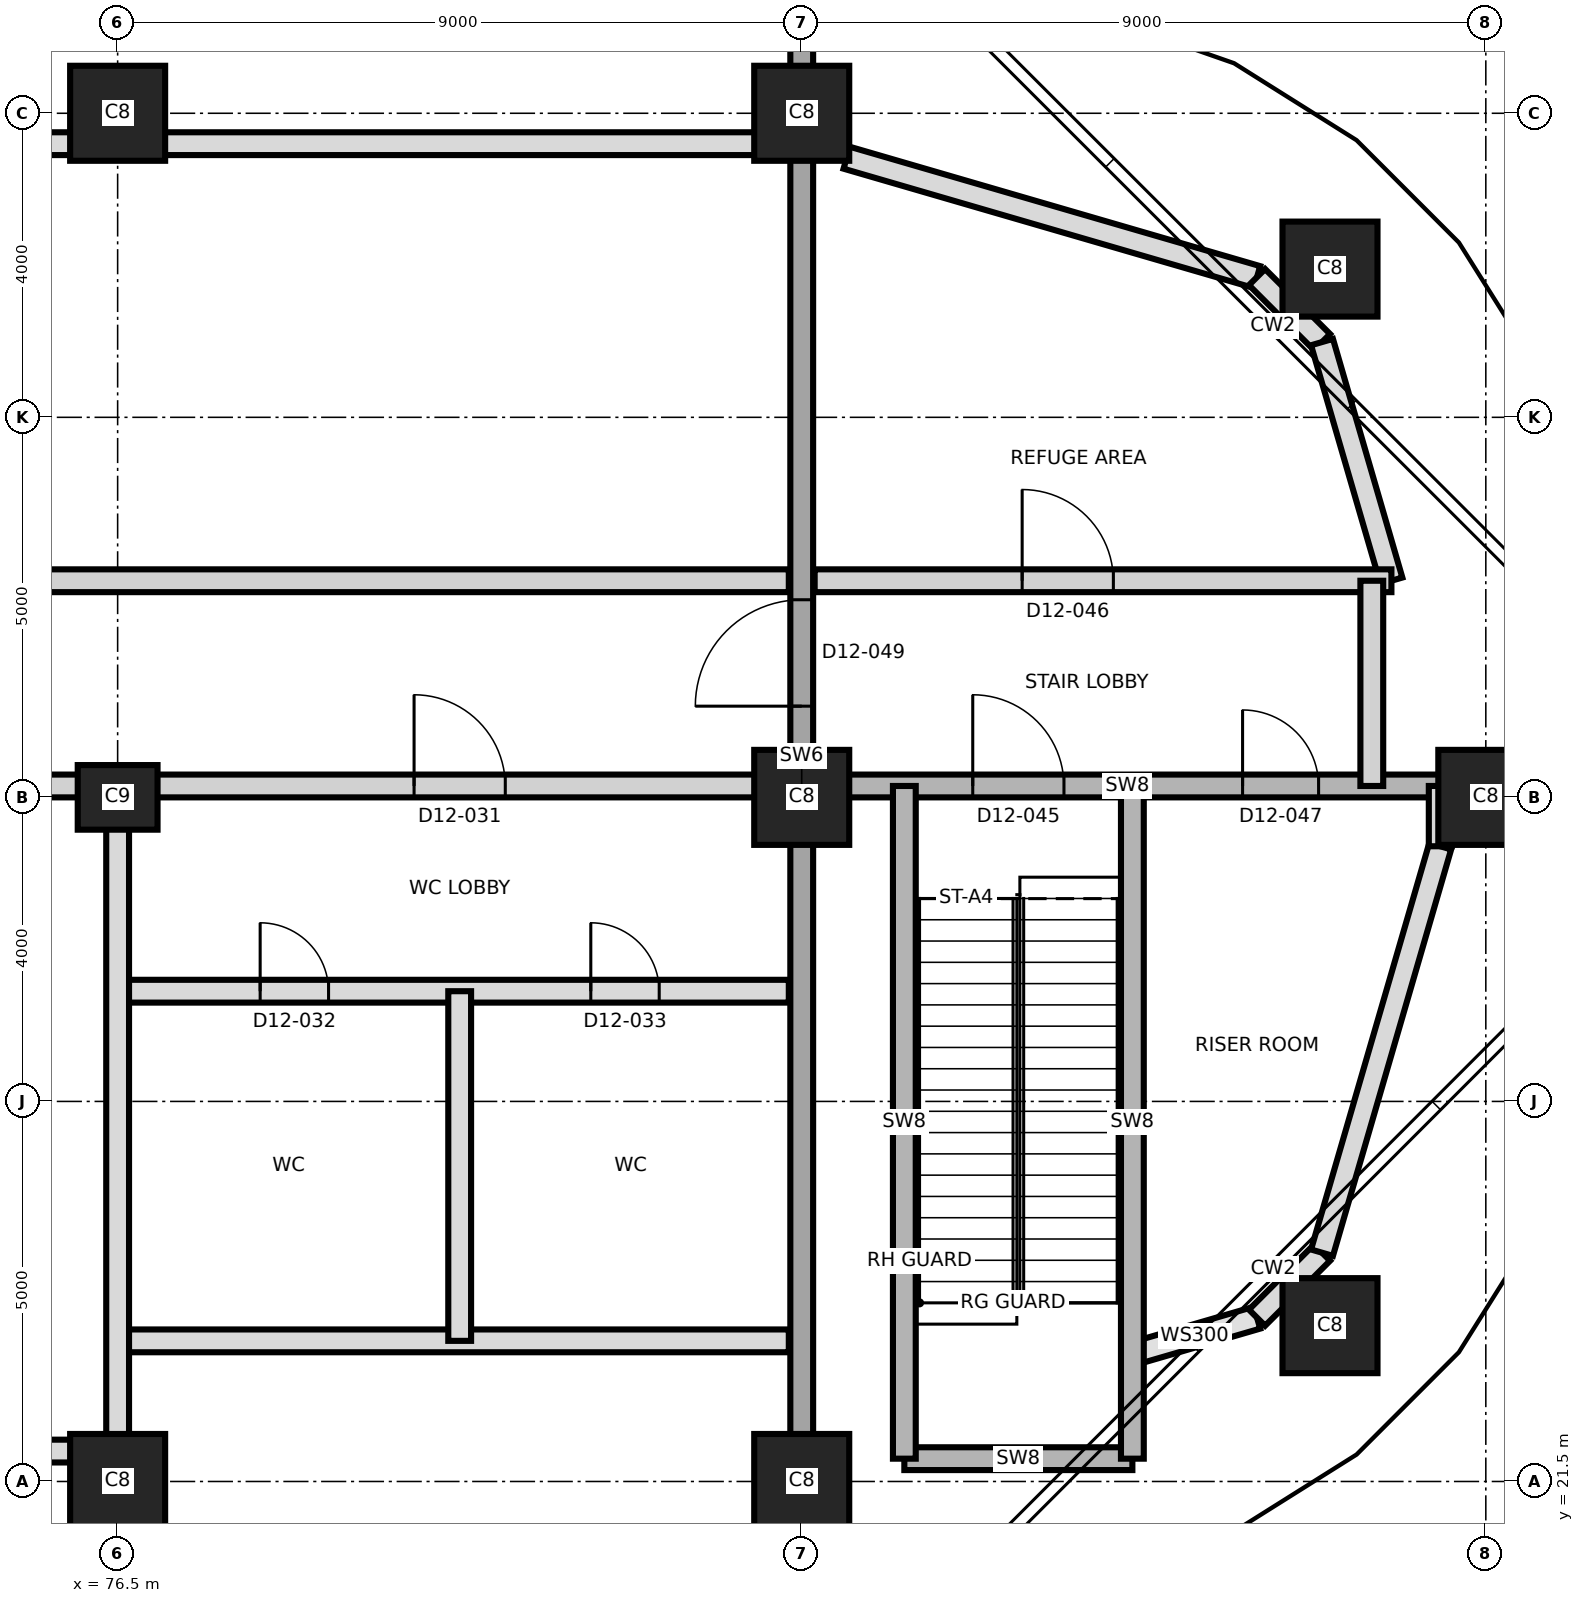
"""IFC4 building model, lengths in metres.
Left out: names, types, materials, properties, quantities, classifications, styles, units other than length and angle.
Written with IfcOpenShell. Run it as: python <this file> out.ifc"""

import sys

from ifc_helpers import new_model, si_unit, direction, frame, frame_2d, origin, origin_2d, place, context, subcontext, project, spatial, rectangle, extrude, element, fill, save


model = new_model("IFC4")
c1 = context("Model", 3, precision=1e-05, world=origin(), true_north=direction((0.0, 1.0)))
c2 = subcontext(c1, "Body", "Model", "MODEL_VIEW")
j1 = project(units=[si_unit("LENGTHUNIT", "METRE"), si_unit("PLANEANGLEUNIT", "RADIAN")], contexts=[c1])
p1 = place(None, origin())
s1 = spatial("IfcSite", under=j1, at=p1, CompositionType="ELEMENT")
p2 = place(p1, origin())
s2 = spatial("IfcBuilding", under=s1, at=p2, CompositionType="ELEMENT")
p3 = place(p2, frame((0.0, 0.0, 135.2)))
s3 = spatial("IfcBuildingStorey", under=s2, at=p3, CompositionType="ELEMENT", Elevation=135.2)
for number, where, z_axis, x_axis in (
    (1, (76.5, 21.5, 0.0), (0.0, 0.0, 1.0), (1.0, 0.0, 0.0)),
    (2, (85.5, 21.5, 0.0), (0.0, 0.0, 1.0), (1.0, 0.0, 0.0)),
    (3, (92.45, 23.55, 0.0), (0.0, 0.0, 1.0), (1.0, 0.0, 0.0)),
):
    element("IfcColumn", number, at=place(p3, frame(where, z_axis=z_axis, x_axis=x_axis)), inside=s3, PredefinedType="COLUMN", context=c2, shape_type="SweptSolid", body=[
        extrude(rectangle(XDim=1.25, YDim=1.25, at=origin_2d()), origin(), (0.0, 0.0, 1.0), 7.0),
    ])
p4 = place(p3, frame((76.5, 30.5, 0.0), z_axis=(0.0, 0.0, 1.0), x_axis=(1.0, 0.0, 0.0)))
e4 = element("IfcColumn", 4, at=p4, inside=s3, PredefinedType="COLUMN", context=c2, shape_type="SweptSolid", body=[
    extrude(rectangle(XDim=1.05, YDim=0.85, at=origin_2d()), origin(), (0.0, 0.0, 1.0), 7.0),
])
for number, where, z_axis, x_axis in (
    (5, (85.5, 30.5, 0.0), (0.0, 0.0, 1.0), (1.0, 0.0, 0.0)),
    (6, (94.5, 30.5, 0.0), (0.0, 0.0, 1.0), (1.0, 0.0, 0.0)),
    (7, (92.45, 37.45, 0.0), (0.0, 0.0, 1.0), (1.0, 0.0, 0.0)),
    (8, (76.5, 39.5, 0.0), (0.0, 0.0, 1.0), (1.0, 0.0, 0.0)),
    (9, (85.5, 39.5, 0.0), (0.0, 0.0, 1.0), (1.0, 0.0, 0.0)),
):
    element("IfcColumn", number, at=place(p3, frame(where, z_axis=z_axis, x_axis=x_axis)), inside=s3, PredefinedType="COLUMN", context=c2, shape_type="SweptSolid", body=[
        extrude(rectangle(XDim=1.25, YDim=1.25, at=origin_2d()), origin(), (0.0, 0.0, 1.0), 7.0),
    ])
p5 = place(p3, frame((85.5, 20.35, 0.0), z_axis=(0.0, 0.0, 1.0), x_axis=(0.0, 1.0, 0.0)))
e10 = element("IfcWall", 10, at=p5, inside=s3, PredefinedType="SHEAR", context=c2, shape_type="SweptSolid", body=[
    extrude(rectangle(XDim=20.3, YDim=0.3, at=frame_2d((10.15, 0.0))), origin(), (0.0, 0.0, 1.0), 7.0),
])
p6 = place(p5, frame((11.35, 0.0, 0.0)))
e11 = element("IfcOpeningElement", 11, at=p6, cuts=e10, PredefinedType="OPENING", context=c2, shape_type="SweptSolid", body=[
    extrude(rectangle(XDim=1.4, YDim=2.1, at=frame_2d((0.7, 1.05))), frame((0.0, 0.16, 0.0), z_axis=(0.0, -1.0, 0.0), x_axis=(1.0, 0.0, 0.0)), (0.0, 0.0, 1.0), 0.32),
])
p7 = place(p3, frame((85.781, 39.693, 0.0), z_axis=(0.0, 0.0, 1.0), x_axis=(0.048421151463, -0.99882700809, 0.0)))
e12 = element("IfcWall", 12, at=p7, inside=s3, PredefinedType="PARTITIONING", context=c2, shape_type="SweptSolid", body=[
    extrude(rectangle(XDim=0.434, YDim=0.3, at=frame_2d((0.217, 0.0))), origin(), (0.0, 0.0, 1.0), 6.7),
])
p8 = place(p3, frame((86.092, 38.915, 0.0), z_axis=(0.0, 0.0, 1.0), x_axis=(0.9602069438, -0.279289500479, 0.0)))
e13 = element("IfcWall", 13, at=p8, inside=s3, PredefinedType="PARTITIONING", context=c2, shape_type="SweptSolid", body=[
    extrude(rectangle(XDim=5.622, YDim=0.3, at=frame_2d((2.811, 0.0))), origin(), (0.0, 0.0, 1.0), 6.7),
])
p9 = place(p3, frame((89.85, 23.178, 0.0), z_axis=(0.0, 0.0, 1.0), x_axis=(0.960196690803, 0.279324748225, 0.0)))
e14 = element("IfcWall", 14, at=p9, inside=s3, PredefinedType="SOLIDWALL", context=c2, shape_type="SweptSolid", body=[
    extrude(rectangle(XDim=1.708, YDim=0.3, at=frame_2d((0.854, 0.0))), origin(), (0.0, 0.0, 1.0), 6.7),
])
for number, where, z_axis, x_axis in (
    (15, (91.49, 37.345, 0.0), (0.0, 0.0, 1.0), (0.707, -0.707, 0.0)),
    (16, (91.49, 23.655, 0.0), (0.0, 0.0, 1.0), (0.707, 0.707, 0.0)),
):
    element("IfcWall", number, at=place(p3, frame(where, z_axis=z_axis, x_axis=x_axis)), inside=s3, PredefinedType="PARTITIONING", context=c2, shape_type="SweptSolid", body=[
        extrude(rectangle(XDim=1.209, YDim=0.3, at=frame_2d((0.604, 0.0))), origin(), (0.0, 0.0, 1.0), 6.7),
    ])
p10 = place(p3, frame((92.345, 36.49, 0.0), z_axis=(0.0, 0.0, 1.0), x_axis=(0.279234420432, -0.960222962882, 0.0)))
e17 = element("IfcWall", 17, at=p10, inside=s3, PredefinedType="PARTITIONING", context=c2, shape_type="SweptSolid", body=[
    extrude(rectangle(XDim=3.27, YDim=0.3, at=frame_2d((1.635, 0.0))), origin(), (0.0, 0.0, 1.0), 6.7),
])
p11 = place(p3, frame((92.345, 24.51, 0.0), z_axis=(0.0, 0.0, 1.0), x_axis=(0.279240609455, 0.960221163082, 0.0)))
e18 = element("IfcWall", 18, at=p11, inside=s3, PredefinedType="PARTITIONING", context=c2, shape_type="SweptSolid", body=[
    extrude(rectangle(XDim=5.568, YDim=0.3, at=frame_2d((2.784, 0.0))), origin(), (0.0, 0.0, 1.0), 6.7),
])
p12 = place(p3, frame((86.85, 21.8, 0.0), z_axis=(0.0, 0.0, 1.0), x_axis=(1.0, 0.0, 0.0)))
e19 = element("IfcWall", 19, at=p12, inside=s3, PredefinedType="SHEAR", context=c2, shape_type="SweptSolid", body=[
    extrude(rectangle(XDim=3.0, YDim=0.3, at=frame_2d((1.5, 0.0))), origin(), (0.0, 0.0, 1.0), 6.7),
])
p13 = place(p3, frame((58.8, 21.9, 0.0), z_axis=(0.0, 0.0, 1.0), x_axis=(1.0, 0.0, 0.0)))
e20 = element("IfcWall", 20, at=p13, inside=s3, PredefinedType="PARTITIONING", context=c2, shape_type="SweptSolid", body=[
    extrude(rectangle(XDim=17.7, YDim=0.3, at=frame_2d((8.85, 0.0))), origin(), (0.0, 0.0, 1.0), 6.7),
])
p14 = place(p3, frame((76.5, 23.35, 0.0), z_axis=(0.0, 0.0, 1.0), x_axis=(1.0, 0.0, 0.0)))
e21 = element("IfcWall", 21, at=p14, inside=s3, PredefinedType="PARTITIONING", context=c2, shape_type="SweptSolid", body=[
    extrude(rectangle(XDim=8.83, YDim=0.3, at=frame_2d((4.415, 0.0))), origin(), (0.0, 0.0, 1.0), 6.7),
])
p15 = place(p3, frame((76.5, 27.95, 0.0), z_axis=(0.0, 0.0, 1.0), x_axis=(1.0, 0.0, 0.0)))
e22 = element("IfcWall", 22, at=p15, inside=s3, PredefinedType="PARTITIONING", context=c2, shape_type="SweptSolid", body=[
    extrude(rectangle(XDim=8.83, YDim=0.3, at=frame_2d((4.415, 0.0))), origin(), (0.0, 0.0, 1.0), 6.7),
])
p16 = place(p15, frame((1.875, 0.0, 0.0)))
e23 = element("IfcOpeningElement", 23, at=p16, cuts=e22, PredefinedType="OPENING", context=c2, shape_type="SweptSolid", body=[
    extrude(rectangle(XDim=0.9, YDim=2.1, at=frame_2d((0.45, 1.05))), frame((0.0, 0.16, 0.0), z_axis=(0.0, -1.0, 0.0), x_axis=(1.0, 0.0, 0.0)), (0.0, 0.0, 1.0), 0.32),
])
p17 = place(p15, frame((6.225, 0.0, 0.0)))
e24 = element("IfcOpeningElement", 24, at=p17, cuts=e22, PredefinedType="OPENING", context=c2, shape_type="SweptSolid", body=[
    extrude(rectangle(XDim=0.9, YDim=2.1, at=frame_2d((0.45, 1.05))), frame((0.0, 0.16, 0.0), z_axis=(0.0, -1.0, 0.0), x_axis=(1.0, 0.0, 0.0)), (0.0, 0.0, 1.0), 0.32),
])
p18 = place(p3, frame((58.8, 30.65, 0.0), z_axis=(0.0, 0.0, 1.0), x_axis=(1.0, 0.0, 0.0)))
e25 = element("IfcWall", 25, at=p18, inside=s3, PredefinedType="PARTITIONING", context=c2, shape_type="SweptSolid", body=[
    extrude(rectangle(XDim=26.53, YDim=0.3, at=frame_2d((13.265, 0.0))), origin(), (0.0, 0.0, 1.0), 6.7),
])
p19 = place(p18, frame((9.3, 0.0, 0.0)))
e26 = element("IfcOpeningElement", 26, at=p19, cuts=e25, PredefinedType="OPENING", context=c2, shape_type="SweptSolid", body=[
    extrude(rectangle(XDim=1.8, YDim=2.1, at=frame_2d((0.9, 1.05))), frame((0.0, 0.16, 0.0), z_axis=(0.0, -1.0, 0.0), x_axis=(1.0, 0.0, 0.0)), (0.0, 0.0, 1.0), 0.32),
])
p20 = place(p18, frame((21.6, 0.0, 0.0)))
e27 = element("IfcOpeningElement", 27, at=p20, cuts=e25, PredefinedType="OPENING", context=c2, shape_type="SweptSolid", body=[
    extrude(rectangle(XDim=1.2, YDim=2.1, at=frame_2d((0.6, 1.05))), frame((0.0, 0.16, 0.0), z_axis=(0.0, -1.0, 0.0), x_axis=(1.0, 0.0, 0.0)), (0.0, 0.0, 1.0), 0.32),
])
p21 = place(p3, frame((85.67, 30.65, 0.0), z_axis=(0.0, 0.0, 1.0), x_axis=(1.0, 0.0, 0.0)))
e28 = element("IfcWall", 28, at=p21, inside=s3, PredefinedType="SHEAR", context=c2, shape_type="SweptSolid", body=[
    extrude(rectangle(XDim=8.23, YDim=0.3, at=frame_2d((4.115, 0.0))), origin(), (0.0, 0.0, 1.0), 6.7),
])
p22 = place(p21, frame((2.08, 0.0, 0.0)))
e29 = element("IfcOpeningElement", 29, at=p22, cuts=e28, PredefinedType="OPENING", context=c2, shape_type="SweptSolid", body=[
    extrude(rectangle(XDim=1.2, YDim=2.1, at=frame_2d((0.6, 1.05))), frame((0.0, 0.16, 0.0), z_axis=(0.0, -1.0, 0.0), x_axis=(1.0, 0.0, 0.0)), (0.0, 0.0, 1.0), 0.32),
])
p23 = place(p21, frame((5.63, 0.0, 0.0)))
e30 = element("IfcOpeningElement", 30, at=p23, cuts=e28, PredefinedType="OPENING", context=c2, shape_type="SweptSolid", body=[
    extrude(rectangle(XDim=1.0, YDim=2.1, at=frame_2d((0.5, 1.05))), frame((0.0, 0.16, 0.0), z_axis=(0.0, -1.0, 0.0), x_axis=(1.0, 0.0, 0.0)), (0.0, 0.0, 1.0), 0.32),
])
p24 = place(p3, frame((58.8, 33.35, 0.0), z_axis=(0.0, 0.0, 1.0), x_axis=(1.0, 0.0, 0.0)))
e31 = element("IfcWall", 31, at=p24, inside=s3, PredefinedType="PARTITIONING", context=c2, shape_type="SweptSolid", body=[
    extrude(rectangle(XDim=26.53, YDim=0.3, at=frame_2d((13.265, 0.0))), origin(), (0.0, 0.0, 1.0), 6.7),
])
p25 = place(p24, frame((12.0, 0.0, 0.0)))
e32 = element("IfcOpeningElement", 32, at=p25, cuts=e31, PredefinedType="OPENING", context=c2, shape_type="SweptSolid", body=[
    extrude(rectangle(XDim=2.4, YDim=2.4, at=frame_2d((1.2, 1.2))), frame((0.0, 0.16, 0.0), z_axis=(0.0, -1.0, 0.0), x_axis=(1.0, 0.0, 0.0)), (0.0, 0.0, 1.0), 0.32),
])
p26 = place(p3, frame((85.67, 33.35, 0.0), z_axis=(0.0, 0.0, 1.0), x_axis=(1.0, 0.0, 0.0)))
e33 = element("IfcWall", 33, at=p26, inside=s3, PredefinedType="PARTITIONING", context=c2, shape_type="SweptSolid", body=[
    extrude(rectangle(XDim=7.588, YDim=0.3, at=frame_2d((3.794, 0.0))), origin(), (0.0, 0.0, 1.0), 6.7),
])
p27 = place(p26, frame((2.73, 0.0, 0.0)))
e34 = element("IfcOpeningElement", 34, at=p27, cuts=e33, PredefinedType="OPENING", context=c2, shape_type="SweptSolid", body=[
    extrude(rectangle(XDim=1.2, YDim=2.1, at=frame_2d((0.6, 1.05))), frame((0.0, 0.16, 0.0), z_axis=(0.0, -1.0, 0.0), x_axis=(1.0, 0.0, 0.0)), (0.0, 0.0, 1.0), 0.32),
])
p28 = place(p3, frame((58.8, 39.1, 0.0), z_axis=(0.0, 0.0, 1.0), x_axis=(1.0, 0.0, 0.0)))
e35 = element("IfcWall", 35, at=p28, inside=s3, PredefinedType="PARTITIONING", context=c2, shape_type="SweptSolid", body=[
    extrude(rectangle(XDim=26.53, YDim=0.3, at=frame_2d((13.265, 0.0))), origin(), (0.0, 0.0, 1.0), 6.7),
])
p29 = place(p3, frame((76.5, 21.9, 0.0), z_axis=(0.0, 0.0, 1.0), x_axis=(0.0, 1.0, 0.0)))
e36 = element("IfcWall", 36, at=p29, inside=s3, PredefinedType="PARTITIONING", context=c2, shape_type="SweptSolid", body=[
    extrude(rectangle(XDim=8.75, YDim=0.3, at=frame_2d((4.375, 0.0))), origin(), (0.0, 0.0, 1.0), 6.7),
])
p30 = place(p3, frame((81.0, 23.35, 0.0), z_axis=(0.0, 0.0, 1.0), x_axis=(0.0, 1.0, 0.0)))
e37 = element("IfcWall", 37, at=p30, inside=s3, PredefinedType="PARTITIONING", context=c2, shape_type="SweptSolid", body=[
    extrude(rectangle(XDim=4.6, YDim=0.3, at=frame_2d((2.3, 0.0))), origin(), (0.0, 0.0, 1.0), 6.7),
])
for number, where, z_axis, x_axis in (
    (38, (86.85, 21.8, 0.0), (0.0, 0.0, 1.0), (0.0, 1.0, 0.0)),
    (39, (89.85, 21.8, 0.0), (0.0, 0.0, 1.0), (0.0, 1.0, 0.0)),
):
    element("IfcWall", number, at=place(p3, frame(where, z_axis=z_axis, x_axis=x_axis)), inside=s3, PredefinedType="SHEAR", context=c2, shape_type="SweptSolid", body=[
        extrude(rectangle(XDim=8.85, YDim=0.3, at=frame_2d((4.425, 0.0))), origin(), (0.0, 0.0, 1.0), 6.7),
    ])
p31 = place(p3, frame((93.0, 30.65, 0.0), z_axis=(0.0, 0.0, 1.0), x_axis=(0.0, 1.0, 0.0)))
e40 = element("IfcWall", 40, at=p31, inside=s3, PredefinedType="PARTITIONING", context=c2, shape_type="SweptSolid", body=[
    extrude(rectangle(XDim=2.7, YDim=0.3, at=frame_2d((1.35, 0.0))), origin(), (0.0, 0.0, 1.0), 6.7),
])
p32 = place(p3, frame((93.9, 29.857, 0.0), z_axis=(0.0, 0.0, 1.0), x_axis=(0.0, 1.0, 0.0)))
e41 = element("IfcWall", 41, at=p32, inside=s3, PredefinedType="PARTITIONING", context=c2, shape_type="SweptSolid", body=[
    extrude(rectangle(XDim=0.793, YDim=0.3, at=frame_2d((0.396, 0.0))), origin(), (0.0, 0.0, 1.0), 6.7),
])
p33 = place(p20, origin())
e42 = element("IfcDoor", 42, at=p33, inside=s3, OperationType="SINGLE_SWING_LEFT", PredefinedType="DOOR", context=c2, shape_type="SweptSolid", body=[
    extrude(rectangle(XDim=1.2, YDim=2.1, at=frame_2d((0.6, 1.05))), frame((0.0, 0.025, 0.0), z_axis=(0.0, -1.0, 0.0), x_axis=(1.0, 0.0, 0.0)), (0.0, 0.0, 1.0), 0.05),
])
fill(e27, e42)
p34 = place(p16, origin())
e43 = element("IfcDoor", 43, at=p34, inside=s3, OperationType="SINGLE_SWING_LEFT", PredefinedType="DOOR", context=c2, shape_type="SweptSolid", body=[
    extrude(rectangle(XDim=0.9, YDim=2.1, at=frame_2d((0.45, 1.05))), frame((0.0, 0.025, 0.0), z_axis=(0.0, -1.0, 0.0), x_axis=(1.0, 0.0, 0.0)), (0.0, 0.0, 1.0), 0.05),
])
fill(e23, e43)
p35 = place(p17, origin())
e44 = element("IfcDoor", 44, at=p35, inside=s3, OperationType="SINGLE_SWING_RIGHT", PredefinedType="DOOR", context=c2, shape_type="SweptSolid", body=[
    extrude(rectangle(XDim=0.9, YDim=2.1, at=frame_2d((0.45, 1.05))), frame((0.0, 0.025, 0.0), z_axis=(0.0, -1.0, 0.0), x_axis=(1.0, 0.0, 0.0)), (0.0, 0.0, 1.0), 0.05),
])
fill(e24, e44)
p36 = place(p22, origin())
e45 = element("IfcDoor", 45, at=p36, inside=s3, OperationType="SINGLE_SWING_LEFT", PredefinedType="DOOR", context=c2, shape_type="SweptSolid", body=[
    extrude(rectangle(XDim=1.2, YDim=2.1, at=frame_2d((0.6, 1.05))), frame((0.0, 0.025, 0.0), z_axis=(0.0, -1.0, 0.0), x_axis=(1.0, 0.0, 0.0)), (0.0, 0.0, 1.0), 0.05),
])
fill(e29, e45)
p37 = place(p27, origin())
e46 = element("IfcDoor", 46, at=p37, inside=s3, OperationType="SINGLE_SWING_LEFT", PredefinedType="DOOR", context=c2, shape_type="SweptSolid", body=[
    extrude(rectangle(XDim=1.2, YDim=2.1, at=frame_2d((0.6, 1.05))), frame((0.0, 0.025, 0.0), z_axis=(0.0, -1.0, 0.0), x_axis=(1.0, 0.0, 0.0)), (0.0, 0.0, 1.0), 0.05),
])
fill(e34, e46)
p38 = place(p23, origin())
e47 = element("IfcDoor", 47, at=p38, inside=s3, OperationType="SINGLE_SWING_LEFT", PredefinedType="DOOR", context=c2, shape_type="SweptSolid", body=[
    extrude(rectangle(XDim=1.0, YDim=2.1, at=frame_2d((0.5, 1.05))), frame((0.0, 0.025, 0.0), z_axis=(0.0, -1.0, 0.0), x_axis=(1.0, 0.0, 0.0)), (0.0, 0.0, 1.0), 0.05),
])
fill(e30, e47)
p39 = place(p6, origin())
e48 = element("IfcDoor", 48, at=p39, inside=s3, OperationType="SINGLE_SWING_RIGHT", PredefinedType="DOOR", context=c2, shape_type="SweptSolid", body=[
    extrude(rectangle(XDim=1.4, YDim=2.1, at=frame_2d((0.7, 1.05))), frame((0.0, 0.025, 0.0), z_axis=(0.0, -1.0, 0.0), x_axis=(1.0, 0.0, 0.0)), (0.0, 0.0, 1.0), 0.05),
])
fill(e11, e48)
save(model, sys.argv[1])
